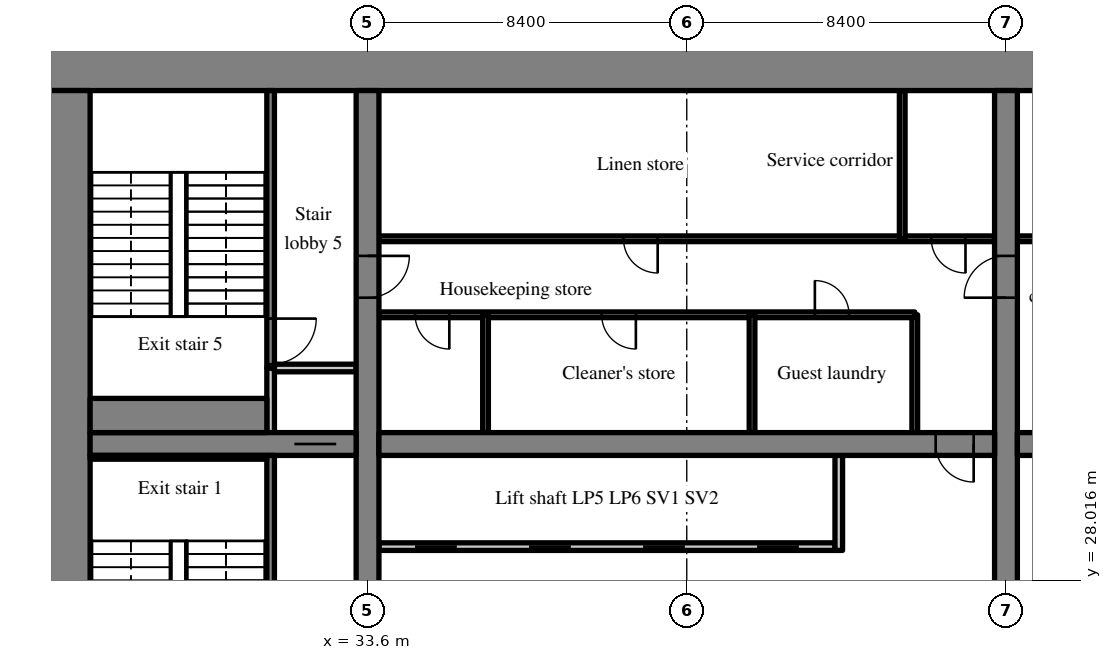
"""IFC4 building model, lengths in metres.
Left out: names, types, materials, properties, quantities, classifications, styles, units other than length and angle.
Written with IfcOpenShell. Run it as: python <this file> out.ifc"""

import sys

from ifc_helpers import new_model, si_unit, direction, frame, frame_2d, origin, place, context, subcontext, project, spatial, rectangle, extrude, source, transform, mapped, element, fill, save


model = new_model("IFC4")
c1 = context("Model", 3, precision=1e-05, world=origin(), true_north=direction((0.0, 1.0)))
c2 = subcontext(c1, "Body", "Model", "MODEL_VIEW")
j1 = project(units=[si_unit("LENGTHUNIT", "METRE"), si_unit("PLANEANGLEUNIT", "RADIAN")], contexts=[c1])
p1 = place(None, origin())
s1 = spatial("IfcSite", under=j1, at=p1, CompositionType="ELEMENT")
p2 = place(p1, origin())
s2 = spatial("IfcBuilding", under=s1, at=p2, CompositionType="ELEMENT")
p3 = place(p2, frame((0.0, 0.0, 43.0)))
s3 = spatial("IfcBuildingStorey", under=s2, at=p3, CompositionType="ELEMENT", Elevation=43.0)
m1 = source(origin(), c2, "Body", "SweptSolid", [
    extrude(rectangle(XDim=50.4, YDim=1.1, at=frame_2d((25.2, 0.0))), origin(), (0.0, 0.0, 1.0), 3.52),
])
p4 = place(p3, frame((25.2, 41.45, 0.0), z_axis=(0.0, 0.0, 1.0), x_axis=(1.0, 0.0, 0.0)))
e1 = element("IfcWall", 1, at=p4, inside=s3, PredefinedType="SHEAR", context=c2, shape_type="MappedRepresentation", body=[
    mapped(m1, transform((0.0, 0.0, 0.0), scale=1.0)),
])
m2 = source(origin(), c2, "Body", "SweptSolid", [
    extrude(rectangle(XDim=17.8, YDim=1.1, at=frame_2d((8.9, 0.0))), origin(), (0.0, 0.0, 1.0), 3.52),
])
p5 = place(p3, frame((25.75, 23.1, 0.0), z_axis=(0.0, 0.0, 1.0), x_axis=(0.0, 1.0, 0.0)))
e2 = element("IfcWall", 2, at=p5, inside=s3, PredefinedType="SHEAR", context=c2, shape_type="MappedRepresentation", body=[
    mapped(m2, transform((0.0, 0.0, 0.0), scale=1.0)),
])
m3 = source(origin(), c2, "Body", "SweptSolid", [
    extrude(rectangle(XDim=17.8, YDim=0.6, at=frame_2d((8.9, 0.0))), origin(), (0.0, 0.0, 1.0), 3.52),
])
p6 = place(p3, frame((33.6, 23.1, 0.0), z_axis=(0.0, 0.0, 1.0), x_axis=(0.0, 1.0, 0.0)))
e3 = element("IfcWall", 3, at=p6, inside=s3, PredefinedType="SHEAR", context=c2, shape_type="MappedRepresentation", body=[
    mapped(m3, transform((0.0, 0.0, 0.0), scale=1.0)),
])
m4 = source(origin(), c2, "Body", "SweptSolid", [
    extrude(rectangle(XDim=1.1, YDim=2.1, at=frame_2d((0.55, 1.05))), frame((0.0, 0.31, 0.0), z_axis=(0.0, -1.0, 0.0), x_axis=(1.0, 0.0, 0.0)), (0.0, 0.0, 1.0), 0.62),
])
p7 = place(p6, frame((12.35, 0.0, 0.0)))
e4 = element("IfcOpeningElement", 4, at=p7, cuts=e3, PredefinedType="OPENING", context=c2, shape_type="MappedRepresentation", body=[
    mapped(m4, transform((0.0, 0.0, 0.0), scale=1.0)),
])
p8 = place(p3, frame((50.4, 23.1, 0.0), z_axis=(0.0, 0.0, 1.0), x_axis=(0.0, 1.0, 0.0)))
e5 = element("IfcWall", 5, at=p8, inside=s3, PredefinedType="SHEAR", context=c2, shape_type="MappedRepresentation", body=[
    mapped(m3, transform((0.0, 0.0, 0.0), scale=1.0)),
])
p9 = place(p8, frame((12.35, 0.0, 0.0)))
e6 = element("IfcOpeningElement", 6, at=p9, cuts=e5, PredefinedType="OPENING", context=c2, shape_type="MappedRepresentation", body=[
    mapped(m4, transform((0.0, 0.0, 0.0), scale=1.0)),
])
m5 = source(origin(), c2, "Body", "SweptSolid", [
    extrude(rectangle(XDim=7.0, YDim=0.6, at=frame_2d((3.5, 0.0))), origin(), (0.0, 0.0, 1.0), 3.52),
])
p10 = place(p3, frame((26.3, 31.6, 0.0), z_axis=(0.0, 0.0, 1.0), x_axis=(1.0, 0.0, 0.0)))
e7 = element("IfcWall", 7, at=p10, inside=s3, PredefinedType="SHEAR", context=c2, shape_type="MappedRepresentation", body=[
    mapped(m5, transform((0.0, 0.0, 0.0), scale=1.0)),
])
p11 = place(p10, frame((5.375, 0.0, 0.0)))
e8 = element("IfcOpeningElement", 8, at=p11, cuts=e7, PredefinedType="OPENING", context=c2, shape_type="MappedRepresentation", body=[
    mapped(m4, transform((0.0, 0.0, 0.0), scale=1.0)),
])
m6 = source(origin(), c2, "Body", "SweptSolid", [
    extrude(rectangle(XDim=16.2, YDim=0.6, at=frame_2d((8.1, 0.0))), origin(), (0.0, 0.0, 1.0), 3.52),
])
p12 = place(p3, frame((33.9, 31.6, 0.0), z_axis=(0.0, 0.0, 1.0), x_axis=(1.0, 0.0, 0.0)))
e9 = element("IfcWall", 9, at=p12, inside=s3, PredefinedType="SHEAR", context=c2, shape_type="MappedRepresentation", body=[
    mapped(m6, transform((0.0, 0.0, 0.0), scale=1.0)),
])
m7 = source(origin(), c2, "Body", "SweptSolid", [
    extrude(rectangle(XDim=1.0, YDim=2.1, at=frame_2d((0.5, 1.05))), frame((0.0, 0.31, 0.0), z_axis=(0.0, -1.0, 0.0), x_axis=(1.0, 0.0, 0.0)), (0.0, 0.0, 1.0), 0.62),
])
p13 = place(p12, frame((14.65, 0.0, 0.0)))
e10 = element("IfcOpeningElement", 10, at=p13, cuts=e9, PredefinedType="OPENING", context=c2, shape_type="MappedRepresentation", body=[
    mapped(m7, transform((0.0, 0.0, 0.0), scale=1.0)),
])
m8 = source(origin(), c2, "Body", "SweptSolid", [
    extrude(rectangle(XDim=16.2, YDim=0.6, at=frame_2d((8.1, 0.0))), origin(), (0.0, 0.0, 1.0), 3.52),
])
p14 = place(p3, frame((50.7, 31.6, 0.0), z_axis=(0.0, 0.0, 1.0), x_axis=(1.0, 0.0, 0.0)))
e11 = element("IfcWall", 11, at=p14, inside=s3, PredefinedType="SHEAR", context=c2, shape_type="MappedRepresentation", body=[
    mapped(m8, transform((0.0, 0.0, 0.0), scale=1.0)),
])
p15 = place(p14, frame((0.55, 0.0, 0.0)))
e12 = element("IfcOpeningElement", 12, at=p15, cuts=e11, PredefinedType="OPENING", context=c2, shape_type="MappedRepresentation", body=[
    mapped(m7, transform((0.0, 0.0, 0.0), scale=1.0)),
])
m9 = source(origin(), c2, "Body", "SweptSolid", [
    extrude(rectangle(XDim=3.559, YDim=0.3, at=frame_2d((1.78, 0.0))), origin(), (0.0, 0.0, 1.0), 3.52),
])
p16 = place(p3, frame((25.55, 39.969, 0.0), z_axis=(0.0, 0.0, 1.0), x_axis=(-0.35779745313, 0.933799219604, 0.0)))
e13 = element("IfcWall", 13, at=p16, inside=s3, PredefinedType="SOLIDWALL", context=c2, shape_type="MappedRepresentation", body=[
    mapped(m9, transform((0.0, 0.0, 0.0), scale=1.0)),
])
m10 = source(origin(), c2, "Body", "SweptSolid", [
    extrude(rectangle(XDim=1.5, YDim=2.0, at=frame_2d((0.75, 1.0))), frame((0.0, 0.16, 0.0), z_axis=(0.0, -1.0, 0.0), x_axis=(1.0, 0.0, 0.0)), (0.0, 0.0, 1.0), 0.32),
])
p17 = place(p16, frame((1.903, 0.0, 0.9)))
e14 = element("IfcOpeningElement", 14, at=p17, cuts=e13, PredefinedType="OPENING", context=c2, shape_type="MappedRepresentation", body=[
    mapped(m10, transform((0.0, 0.0, 0.0), scale=1.0)),
])
m11 = source(origin(), c2, "Body", "SweptSolid", [
    extrude(rectangle(XDim=12.0, YDim=0.2, at=frame_2d((6.0, 0.0))), origin(), (0.0, 0.0, 1.0), 3.52),
])
p18 = place(p3, frame((33.9, 28.9, 0.0), z_axis=(0.0, 0.0, 1.0), x_axis=(1.0, 0.0, 0.0)))
e15 = element("IfcWall", 15, at=p18, inside=s3, PredefinedType="SOLIDWALL", context=c2, shape_type="MappedRepresentation", body=[
    mapped(m11, transform((0.0, 0.0, 0.0), scale=1.0)),
])
m12 = source(origin(), c2, "Body", "SweptSolid", [
    extrude(rectangle(XDim=1.1, YDim=2.1, at=frame_2d((0.55, 1.05))), frame((0.0, 0.11, 0.0), z_axis=(0.0, -1.0, 0.0), x_axis=(1.0, 0.0, 0.0)), (0.0, 0.0, 1.0), 0.22),
])
p19 = place(p18, frame((0.95, 0.0, 0.0)))
e16 = element("IfcOpeningElement", 16, at=p19, cuts=e15, PredefinedType="OPENING", context=c2, shape_type="MappedRepresentation", body=[
    mapped(m12, transform((0.0, 0.0, 0.0), scale=1.0)),
])
p20 = place(p18, frame((3.95, 0.0, 0.0)))
e17 = element("IfcOpeningElement", 17, at=p20, cuts=e15, PredefinedType="OPENING", context=c2, shape_type="MappedRepresentation", body=[
    mapped(m12, transform((0.0, 0.0, 0.0), scale=1.0)),
])
p21 = place(p18, frame((6.95, 0.0, 0.0)))
e18 = element("IfcOpeningElement", 18, at=p21, cuts=e15, PredefinedType="OPENING", context=c2, shape_type="MappedRepresentation", body=[
    mapped(m12, transform((0.0, 0.0, 0.0), scale=1.0)),
])
p22 = place(p18, frame((9.95, 0.0, 0.0)))
e19 = element("IfcOpeningElement", 19, at=p22, cuts=e15, PredefinedType="OPENING", context=c2, shape_type="MappedRepresentation", body=[
    mapped(m12, transform((0.0, 0.0, 0.0), scale=1.0)),
])
m13 = source(origin(), c2, "Body", "SweptSolid", [
    extrude(rectangle(XDim=2.5, YDim=0.2, at=frame_2d((1.25, 0.0))), origin(), (0.0, 0.0, 1.0), 3.52),
])
p23 = place(p3, frame((46.0, 28.8, 0.0), z_axis=(0.0, 0.0, 1.0), x_axis=(0.0, 1.0, 0.0)))
e20 = element("IfcWall", 20, at=p23, inside=s3, PredefinedType="SOLIDWALL", context=c2, shape_type="MappedRepresentation", body=[
    mapped(m13, transform((0.0, 0.0, 0.0), scale=1.0)),
])
m14 = source(origin(), c2, "Body", "SweptSolid", [
    extrude(rectangle(XDim=3.1, YDim=0.15, at=frame_2d((1.55, 0.0))), origin(), (0.0, 0.0, 1.0), 3.52),
])
p24 = place(p3, frame((48.0, 31.9, 0.0), z_axis=(0.0, 0.0, 1.0), x_axis=(0.0, 1.0, 0.0)))
e21 = element("IfcWall", 21, at=p24, inside=s3, PredefinedType="PARTITIONING", context=c2, shape_type="MappedRepresentation", body=[
    mapped(m14, transform((0.0, 0.0, 0.0), scale=1.0)),
])
m15 = source(origin(), c2, "Body", "SweptSolid", [
    extrude(rectangle(XDim=14.1, YDim=0.15, at=frame_2d((7.05, 0.0))), origin(), (0.0, 0.0, 1.0), 3.52),
])
p25 = place(p3, frame((33.9, 35.0, 0.0), z_axis=(0.0, 0.0, 1.0), x_axis=(1.0, 0.0, 0.0)))
e22 = element("IfcWall", 22, at=p25, inside=s3, PredefinedType="PARTITIONING", context=c2, shape_type="MappedRepresentation", body=[
    mapped(m15, transform((0.0, 0.0, 0.0), scale=1.0)),
])
m16 = source(origin(), c2, "Body", "SweptSolid", [
    extrude(rectangle(XDim=0.9, YDim=2.1, at=frame_2d((0.45, 1.05))), frame((0.0, 0.085, 0.0), z_axis=(0.0, -1.0, 0.0), x_axis=(1.0, 0.0, 0.0)), (0.0, 0.0, 1.0), 0.17),
])
p26 = place(p25, frame((0.952, 0.0, 0.0)))
e23 = element("IfcOpeningElement", 23, at=p26, cuts=e22, PredefinedType="OPENING", context=c2, shape_type="MappedRepresentation", body=[
    mapped(m16, transform((0.0, 0.0, 0.0), scale=1.0)),
])
p27 = place(p25, frame((5.861, 0.0, 0.0)))
e24 = element("IfcOpeningElement", 24, at=p27, cuts=e22, PredefinedType="OPENING", context=c2, shape_type="MappedRepresentation", body=[
    mapped(m16, transform((0.0, 0.0, 0.0), scale=1.0)),
])
p28 = place(p25, frame((11.471, 0.0, 0.0)))
e25 = element("IfcOpeningElement", 25, at=p28, cuts=e22, PredefinedType="OPENING", context=c2, shape_type="MappedRepresentation", body=[
    mapped(m16, transform((0.0, 0.0, 0.0), scale=1.0)),
])
m17 = source(origin(), c2, "Body", "SweptSolid", [
    extrude(rectangle(XDim=16.2, YDim=0.15, at=frame_2d((8.1, 0.0))), origin(), (0.0, 0.0, 1.0), 3.52),
])
p29 = place(p3, frame((33.9, 37.0, 0.0), z_axis=(0.0, 0.0, 1.0), x_axis=(1.0, 0.0, 0.0)))
e26 = element("IfcWall", 26, at=p29, inside=s3, PredefinedType="PARTITIONING", context=c2, shape_type="MappedRepresentation", body=[
    mapped(m17, transform((0.0, 0.0, 0.0), scale=1.0)),
])
p30 = place(p29, frame((6.435, 0.0, 0.0)))
e27 = element("IfcOpeningElement", 27, at=p30, cuts=e26, PredefinedType="OPENING", context=c2, shape_type="MappedRepresentation", body=[
    mapped(m16, transform((0.0, 0.0, 0.0), scale=1.0)),
])
p31 = place(p29, frame((14.535, 0.0, 0.0)))
e28 = element("IfcOpeningElement", 28, at=p31, cuts=e26, PredefinedType="OPENING", context=c2, shape_type="MappedRepresentation", body=[
    mapped(m16, transform((0.0, 0.0, 0.0), scale=1.0)),
])
for number, where, z_axis, x_axis in (
    (29, (36.705, 31.9, 0.0), (0.0, 0.0, 1.0), (0.0, 1.0, 0.0)),
    (30, (43.718, 31.9, 0.0), (0.0, 0.0, 1.0), (0.0, 1.0, 0.0)),
):
    element("IfcWall", number, at=place(p3, frame(where, z_axis=z_axis, x_axis=x_axis)), inside=s3, PredefinedType="PARTITIONING", context=c2, shape_type="MappedRepresentation", body=[
        mapped(m14, transform((0.0, 0.0, 0.0), scale=1.0)),
    ])
m18 = source(origin(), c2, "Body", "SweptSolid", [
    extrude(rectangle(XDim=3.9, YDim=0.15, at=frame_2d((1.95, 0.0))), origin(), (0.0, 0.0, 1.0), 3.52),
])
p32 = place(p3, frame((47.67, 37.0, 0.0), z_axis=(0.0, 0.0, 1.0), x_axis=(0.0, 1.0, 0.0)))
e31 = element("IfcWall", 31, at=p32, inside=s3, PredefinedType="PARTITIONING", context=c2, shape_type="MappedRepresentation", body=[
    mapped(m18, transform((0.0, 0.0, 0.0), scale=1.0)),
])
m19 = source(origin(), c2, "Body", "SweptSolid", [
    extrude(rectangle(XDim=16.2, YDim=0.15, at=frame_2d((8.1, 0.0))), origin(), (0.0, 0.0, 1.0), 3.52),
])
p33 = place(p3, frame((66.9, 37.0, 0.0), z_axis=(0.0, 0.0, 1.0), x_axis=(-1.0, 0.0, 0.0)))
e32 = element("IfcWall", 32, at=p33, inside=s3, PredefinedType="PARTITIONING", context=c2, shape_type="MappedRepresentation", body=[
    mapped(m19, transform((0.0, 0.0, 0.0), scale=1.0)),
])
p34 = place(p33, frame((1.575, 0.0, 0.0)))
e33 = element("IfcOpeningElement", 33, at=p34, cuts=e32, PredefinedType="OPENING", context=c2, shape_type="MappedRepresentation", body=[
    mapped(m16, transform((0.0, 0.0, 0.0), scale=1.0)),
])
p35 = place(p33, frame((7.245, 0.0, 0.0)))
e34 = element("IfcOpeningElement", 34, at=p35, cuts=e32, PredefinedType="OPENING", context=c2, shape_type="MappedRepresentation", body=[
    mapped(m16, transform((0.0, 0.0, 0.0), scale=1.0)),
])
p36 = place(p33, frame((12.105, 0.0, 0.0)))
e35 = element("IfcOpeningElement", 35, at=p36, cuts=e32, PredefinedType="OPENING", context=c2, shape_type="MappedRepresentation", body=[
    mapped(m16, transform((0.0, 0.0, 0.0), scale=1.0)),
])
p37 = place(p33, frame((14.535, 0.0, 0.0)))
e36 = element("IfcOpeningElement", 36, at=p37, cuts=e32, PredefinedType="OPENING", context=c2, shape_type="MappedRepresentation", body=[
    mapped(m16, transform((0.0, 0.0, 0.0), scale=1.0)),
])
m20 = source(origin(), c2, "Body", "SweptSolid", [
    extrude(rectangle(XDim=8.2, YDim=0.2, at=frame_2d((4.1, 0.0))), origin(), (0.0, 0.0, 1.0), 3.52),
])
p38 = place(p3, frame((31.05, 23.1, 0.0), z_axis=(0.0, 0.0, 1.0), x_axis=(0.0, 1.0, 0.0)))
e37 = element("IfcWall", 37, at=p38, inside=s3, PredefinedType="SOLIDWALL", context=c2, shape_type="MappedRepresentation", body=[
    mapped(m20, transform((0.0, 0.0, 0.0), scale=1.0)),
])
m21 = source(origin(), c2, "Body", "SweptSolid", [
    extrude(rectangle(XDim=1.2, YDim=2.1, at=frame_2d((0.6, 1.05))), frame((0.0, 0.11, 0.0), z_axis=(0.0, -1.0, 0.0), x_axis=(1.0, 0.0, 0.0)), (0.0, 0.0, 1.0), 0.22),
])
p39 = place(p38, frame((0.5, 0.0, 0.0)))
e38 = element("IfcOpeningElement", 38, at=p39, cuts=e37, PredefinedType="OPENING", context=c2, shape_type="MappedRepresentation", body=[
    mapped(m21, transform((0.0, 0.0, 0.0), scale=1.0)),
])
m22 = source(origin(), c2, "Body", "SweptSolid", [
    extrude(rectangle(XDim=1.7, YDim=0.2, at=frame_2d((0.85, 0.0))), origin(), (0.0, 0.0, 1.0), 3.52),
])
p40 = place(p3, frame((31.05, 31.9, 0.0), z_axis=(0.0, 0.0, 1.0), x_axis=(0.0, 1.0, 0.0)))
e39 = element("IfcWall", 39, at=p40, inside=s3, PredefinedType="SOLIDWALL", context=c2, shape_type="MappedRepresentation", body=[
    mapped(m22, transform((0.0, 0.0, 0.0), scale=1.0)),
])
m23 = source(origin(), c2, "Body", "SweptSolid", [
    extrude(rectangle(XDim=2.15, YDim=0.2, at=frame_2d((1.075, 0.0))), origin(), (0.0, 0.0, 1.0), 3.52),
])
p41 = place(p3, frame((31.15, 33.6, 0.0), z_axis=(0.0, 0.0, 1.0), x_axis=(1.0, 0.0, 0.0)))
e40 = element("IfcWall", 40, at=p41, inside=s3, PredefinedType="SOLIDWALL", context=c2, shape_type="MappedRepresentation", body=[
    mapped(m23, transform((0.0, 0.0, 0.0), scale=1.0)),
])
m24 = source(origin(), c2, "Body", "SweptSolid", [
    extrude(rectangle(XDim=7.3, YDim=0.2, at=frame_2d((3.65, 0.0))), origin(), (0.0, 0.0, 1.0), 3.52),
])
p42 = place(p3, frame((31.05, 33.6, 0.0), z_axis=(0.0, 0.0, 1.0), x_axis=(0.0, 1.0, 0.0)))
e41 = element("IfcWall", 41, at=p42, inside=s3, PredefinedType="SOLIDWALL", context=c2, shape_type="MappedRepresentation", body=[
    mapped(m24, transform((0.0, 0.0, 0.0), scale=1.0)),
])
p43 = place(p42, frame((0.1, 0.0, 0.0)))
e42 = element("IfcOpeningElement", 42, at=p43, cuts=e41, PredefinedType="OPENING", context=c2, shape_type="MappedRepresentation", body=[
    mapped(m21, transform((0.0, 0.0, 0.0), scale=1.0)),
])
m25 = source(origin(), c2, "Body", "SweptSolid", [
    extrude(rectangle(XDim=4.65, YDim=0.1, at=frame_2d((2.325, 0.0))), origin(), (0.0, 0.0, 1.0), 3.52),
])
p44 = place(p3, frame((26.3, 31.25, 0.0), z_axis=(0.0, 0.0, 1.0), x_axis=(1.0, 0.0, 0.0)))
e43 = element("IfcWall", 43, at=p44, inside=s3, PredefinedType="SOLIDWALL", context=c2, shape_type="MappedRepresentation", body=[
    mapped(m25, transform((0.0, 0.0, 0.0), scale=1.0)),
])
m26 = source(origin(), c2, "Body", "SweptSolid", [
    extrude(rectangle(XDim=4.65, YDim=0.9, at=frame_2d((2.325, 0.0))), origin(), (0.0, 0.0, 1.0), 3.52),
])
p45 = place(p3, frame((26.3, 32.35, 0.0), z_axis=(0.0, 0.0, 1.0), x_axis=(1.0, 0.0, 0.0)))
e44 = element("IfcWall", 44, at=p45, inside=s3, PredefinedType="SOLIDWALL", context=c2, shape_type="MappedRepresentation", body=[
    mapped(m26, transform((0.0, 0.0, 0.0), scale=1.0)),
])
m27 = source(origin(), c2, "Body", "SweptSolid", [
    extrude(rectangle(XDim=1.0, YDim=2.1, at=frame_2d((0.5, 1.05))), frame((0.0, 0.025, 0.0), z_axis=(0.0, -1.0, 0.0), x_axis=(1.0, 0.0, 0.0)), (0.0, 0.0, 1.0), 0.05),
])
p46 = place(p13, origin())
e45 = element("IfcDoor", 45, at=p46, inside=s3, OperationType="SINGLE_SWING_RIGHT", PredefinedType="DOOR", context=c2, shape_type="MappedRepresentation", body=[
    mapped(m27, transform((0.0, 0.0, 0.0), scale=1.0)),
])
fill(e10, e45)
m28 = source(origin(), c2, "Body", "SweptSolid", [
    extrude(rectangle(XDim=1.1, YDim=2.1, at=frame_2d((0.55, 1.05))), frame((0.0, 0.025, 0.0), z_axis=(0.0, -1.0, 0.0), x_axis=(1.0, 0.0, 0.0)), (0.0, 0.0, 1.0), 0.05),
])
p47 = place(p19, origin())
e46 = element("IfcDoor", 46, at=p47, inside=s3, OperationType="SLIDING_TO_LEFT", PredefinedType="DOOR", context=c2, shape_type="MappedRepresentation", body=[
    mapped(m28, transform((0.0, 0.0, 0.0), scale=1.0)),
])
fill(e16, e46)
p48 = place(p20, origin())
e47 = element("IfcDoor", 47, at=p48, inside=s3, OperationType="SLIDING_TO_RIGHT", PredefinedType="DOOR", context=c2, shape_type="MappedRepresentation", body=[
    mapped(m28, transform((0.0, 0.0, 0.0), scale=1.0)),
])
fill(e17, e47)
p49 = place(p21, origin())
e48 = element("IfcDoor", 48, at=p49, inside=s3, OperationType="SLIDING_TO_LEFT", PredefinedType="DOOR", context=c2, shape_type="MappedRepresentation", body=[
    mapped(m28, transform((0.0, 0.0, 0.0), scale=1.0)),
])
fill(e18, e48)
p50 = place(p22, origin())
e49 = element("IfcDoor", 49, at=p50, inside=s3, OperationType="SLIDING_TO_RIGHT", PredefinedType="DOOR", context=c2, shape_type="MappedRepresentation", body=[
    mapped(m28, transform((0.0, 0.0, 0.0), scale=1.0)),
])
fill(e19, e49)
m29 = source(origin(), c2, "Body", "SweptSolid", [
    extrude(rectangle(XDim=0.9, YDim=2.1, at=frame_2d((0.45, 1.05))), frame((0.0, 0.025, 0.0), z_axis=(0.0, -1.0, 0.0), x_axis=(1.0, 0.0, 0.0)), (0.0, 0.0, 1.0), 0.05),
])
p51 = place(p26, origin())
e50 = element("IfcDoor", 50, at=p51, inside=s3, OperationType="SINGLE_SWING_RIGHT", PredefinedType="DOOR", context=c2, shape_type="MappedRepresentation", body=[
    mapped(m29, transform((0.0, 0.0, 0.0), scale=1.0)),
])
fill(e23, e50)
p52 = place(p27, origin())
e51 = element("IfcDoor", 51, at=p52, inside=s3, OperationType="SINGLE_SWING_RIGHT", PredefinedType="DOOR", context=c2, shape_type="MappedRepresentation", body=[
    mapped(m29, transform((0.0, 0.0, 0.0), scale=1.0)),
])
fill(e24, e51)
p53 = place(p28, origin())
e52 = element("IfcDoor", 52, at=p53, inside=s3, OperationType="SINGLE_SWING_LEFT", PredefinedType="DOOR", context=c2, shape_type="MappedRepresentation", body=[
    mapped(m29, transform((0.0, 0.0, 0.0), scale=1.0)),
])
fill(e25, e52)
p54 = place(p30, origin())
e53 = element("IfcDoor", 53, at=p54, inside=s3, OperationType="SINGLE_SWING_RIGHT", PredefinedType="DOOR", context=c2, shape_type="MappedRepresentation", body=[
    mapped(m29, transform((0.0, 0.0, 0.0), scale=1.0)),
])
fill(e27, e53)
p55 = place(p31, origin())
e54 = element("IfcDoor", 54, at=p55, inside=s3, OperationType="SINGLE_SWING_RIGHT", PredefinedType="DOOR", context=c2, shape_type="MappedRepresentation", body=[
    mapped(m29, transform((0.0, 0.0, 0.0), scale=1.0)),
])
fill(e28, e54)
p56 = place(p11, origin())
e55 = element("IfcDoor", 55, at=p56, inside=s3, OperationType="SLIDING_TO_RIGHT", PredefinedType="DOOR", context=c2, shape_type="MappedRepresentation", body=[
    mapped(m28, transform((0.0, 0.0, 0.0), scale=1.0)),
])
fill(e8, e55)
m30 = source(origin(), c2, "Body", "SweptSolid", [
    extrude(rectangle(XDim=1.2, YDim=2.1, at=frame_2d((0.6, 1.05))), frame((0.0, 0.025, 0.0), z_axis=(0.0, -1.0, 0.0), x_axis=(1.0, 0.0, 0.0)), (0.0, 0.0, 1.0), 0.05),
])
p57 = place(p43, origin())
e56 = element("IfcDoor", 56, at=p57, inside=s3, OperationType="SINGLE_SWING_RIGHT", PredefinedType="DOOR", context=c2, shape_type="MappedRepresentation", body=[
    mapped(m30, transform((0.0, 0.0, 0.0), scale=1.0)),
])
fill(e42, e56)
p58 = place(p7, origin())
e57 = element("IfcDoor", 57, at=p58, inside=s3, OperationType="SINGLE_SWING_RIGHT", PredefinedType="DOOR", context=c2, shape_type="MappedRepresentation", body=[
    mapped(m28, transform((0.0, 0.0, 0.0), scale=1.0)),
])
fill(e4, e57)
p59 = place(p9, origin())
e58 = element("IfcDoor", 58, at=p59, inside=s3, OperationType="SINGLE_SWING_LEFT", PredefinedType="DOOR", context=c2, shape_type="MappedRepresentation", body=[
    mapped(m28, transform((0.0, 0.0, 0.0), scale=1.0)),
])
fill(e6, e58)
save(model, sys.argv[1])
